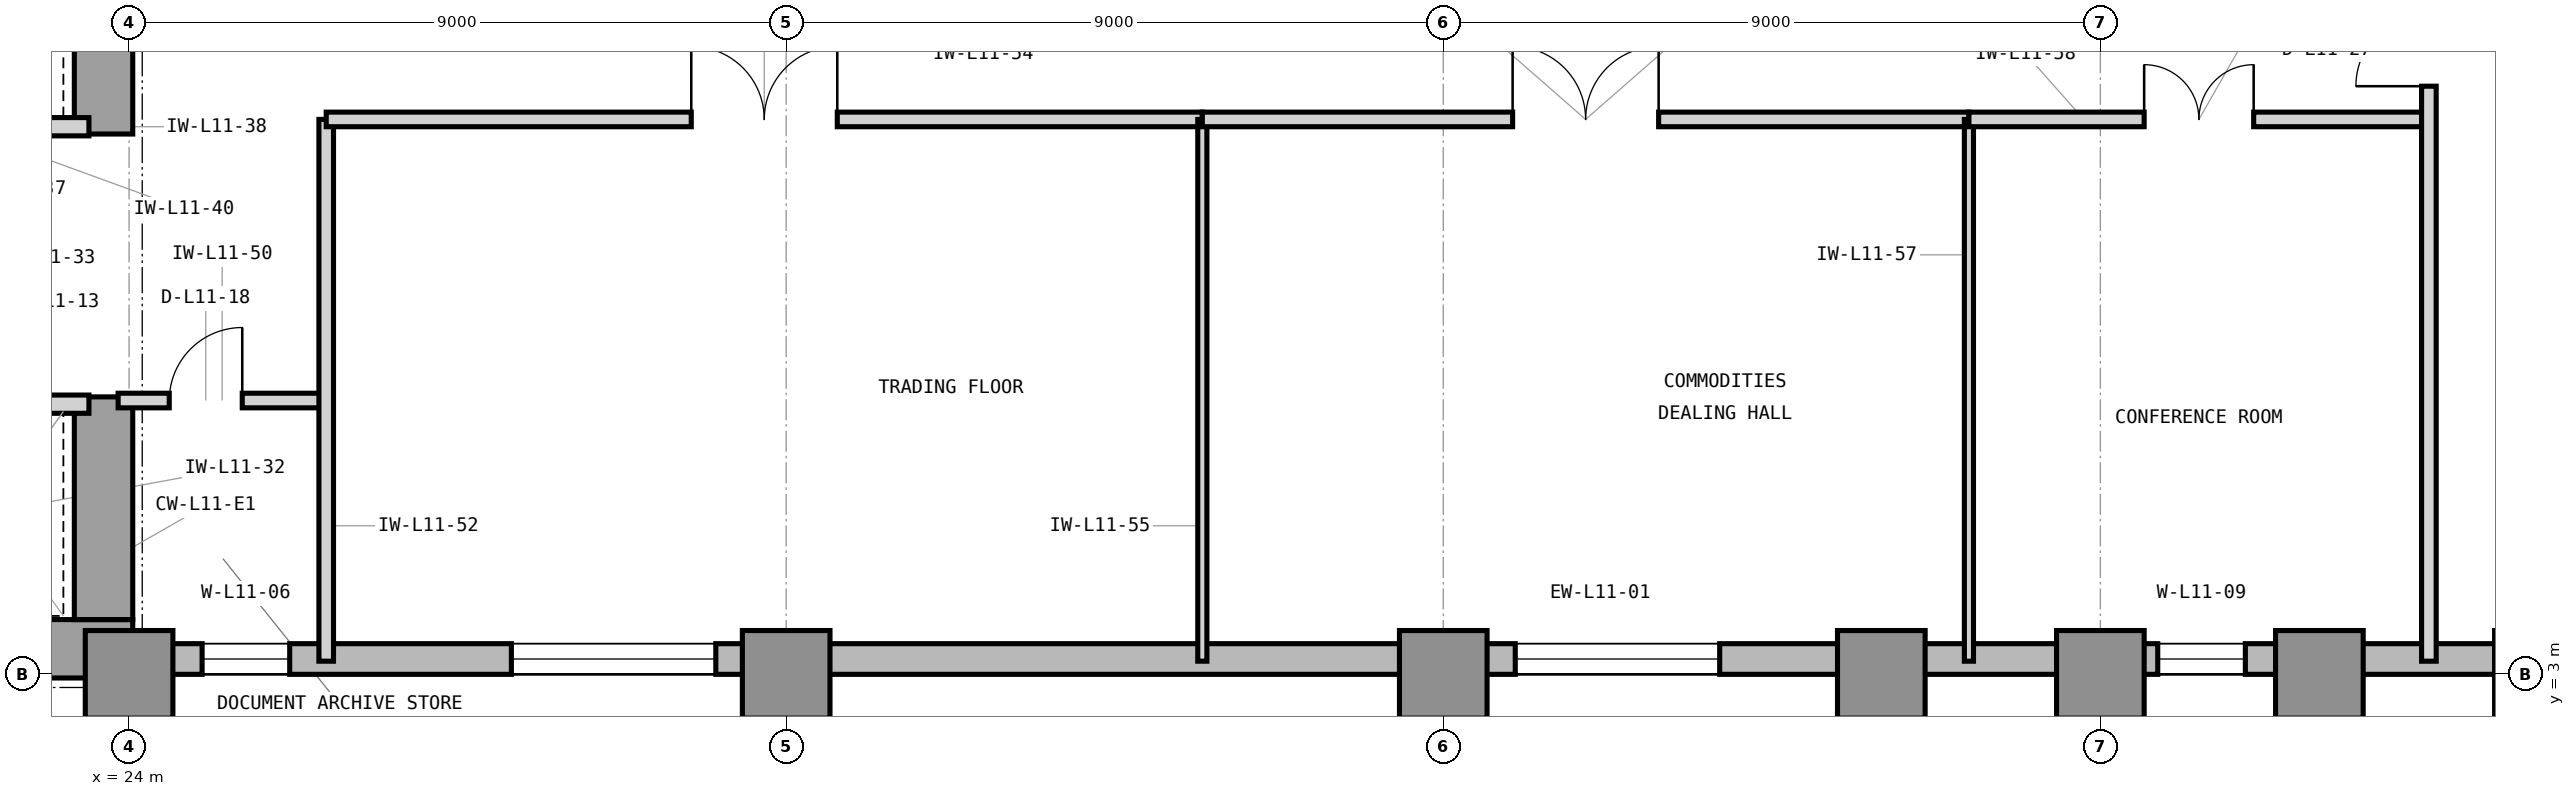
"""IFC4 building model, lengths in metres.
Left out: names, types, materials, properties, quantities, classifications, styles, units other than length and angle.
Written with IfcOpenShell. Run it as: python <this file> out.ifc"""

import sys

from ifc_helpers import new_model, si_unit, direction, frame, frame_2d, origin, origin_2d, place, context, subcontext, project, spatial, rectangle, extrude, element, fill, save


model = new_model("IFC4")
c1 = context("Model", 3, precision=1e-05, world=origin(), true_north=direction((0.0, 1.0)))
c2 = subcontext(c1, "Body", "Model", "MODEL_VIEW")
j1 = project(units=[si_unit("LENGTHUNIT", "METRE"), si_unit("PLANEANGLEUNIT", "RADIAN")], contexts=[c1])
p1 = place(None, origin())
s1 = spatial("IfcSite", under=j1, at=p1, CompositionType="ELEMENT")
p2 = place(p1, origin())
s2 = spatial("IfcBuilding", under=s1, at=p2, CompositionType="ELEMENT")
p3 = place(p2, frame((0.0, 0.0, 51.0)))
s3 = spatial("IfcBuildingStorey", under=s2, at=p3, CompositionType="ELEMENT", Elevation=51.0)
p4 = place(p3, frame((7.475, 3.35, 0.0), z_axis=(0.0, 0.0, 1.0), x_axis=(1.0, 0.0, 0.0)))
e1 = element("IfcWall", 1, at=p4, inside=s3, PredefinedType="SHEAR", context=c2, shape_type="SweptSolid", body=[
    extrude(rectangle(XDim=16.575, YDim=0.8, at=frame_2d((8.288, 0.0))), origin(), (0.0, 0.0, 1.0), 4.2),
])
p5 = place(p3, frame((23.65, 3.75, 0.0), z_axis=(0.0, 0.0, 1.0), x_axis=(0.0, 1.0, 0.0)))
e2 = element("IfcWall", 2, at=p5, inside=s3, PredefinedType="SHEAR", context=c2, shape_type="SweptSolid", body=[
    extrude(rectangle(XDim=3.05, YDim=0.8, at=frame_2d((1.525, 0.0))), origin(), (0.0, 0.0, 1.0), 4.2),
])
p6 = place(p3, frame((23.65, 10.4, 0.0), z_axis=(0.0, 0.0, 1.0), x_axis=(0.0, 1.0, 0.0)))
e3 = element("IfcWall", 3, at=p6, inside=s3, PredefinedType="SHEAR", context=c2, shape_type="SweptSolid", body=[
    extrude(rectangle(XDim=3.2, YDim=0.8, at=frame_2d((1.6, 0.0))), origin(), (0.0, 0.0, 1.0), 4.2),
])
for number, where, z_axis, x_axis in (
    (4, (24.0, 3.0, 0.0), (0.0, 0.0, 1.0), (1.0, 0.0, 0.0)),
    (5, (33.0, 3.0, 0.0), (0.0, 0.0, 1.0), (1.0, 0.0, 0.0)),
    (6, (42.0, 3.0, 0.0), (0.0, 0.0, 1.0), (1.0, 0.0, 0.0)),
    (7, (48.0, 3.0, 0.0), (0.0, 0.0, 1.0), (1.0, 0.0, 0.0)),
    (8, (51.0, 3.0, 0.0), (0.0, 0.0, 1.0), (1.0, 0.0, 0.0)),
    (9, (54.0, 3.0, 0.0), (0.0, 0.0, 1.0), (1.0, 0.0, 0.0)),
    (10, (57.0, 3.0, 0.0), (0.0, 0.0, 1.0), (1.0, 0.0, 0.0)),
):
    element("IfcColumn", number, at=place(p3, frame(where, z_axis=z_axis, x_axis=x_axis)), inside=s3, PredefinedType="COLUMN", context=c2, shape_type="SweptSolid", body=[
        extrude(rectangle(XDim=1.2, YDim=1.2, at=origin_2d()), origin(), (0.0, 0.0, 1.0), 4.2),
    ])
p7 = place(p3, frame((23.9, 3.21, 0.0), z_axis=(0.0, 0.0, 1.0), x_axis=(1.0, 0.0, 0.0)))
e11 = element("IfcWall", 11, at=p7, inside=s3, PredefinedType="STANDARD", context=c2, shape_type="SweptSolid", body=[
    extrude(rectangle(XDim=40.5, YDim=0.42, at=frame_2d((20.25, 0.0))), origin(), (0.0, 0.0, 1.0), 3.98),
])
p8 = place(p7, frame((1.1, 0.0, 0.85)))
e12 = element("IfcOpeningElement", 12, at=p8, cuts=e11, PredefinedType="OPENING", context=c2, shape_type="SweptSolid", body=[
    extrude(rectangle(XDim=1.2, YDim=2.45, at=frame_2d((0.6, 1.225))), frame((0.0, 0.22, 0.0), z_axis=(0.0, -1.0, 0.0), x_axis=(1.0, 0.0, 0.0)), (0.0, 0.0, 1.0), 0.44),
])
p9 = place(p7, frame((5.336, 0.0, 0.85)))
e13 = element("IfcOpeningElement", 13, at=p9, cuts=e11, PredefinedType="OPENING", context=c2, shape_type="SweptSolid", body=[
    extrude(rectangle(XDim=2.8, YDim=2.45, at=frame_2d((1.4, 1.225))), frame((0.0, 0.22, 0.0), z_axis=(0.0, -1.0, 0.0), x_axis=(1.0, 0.0, 0.0)), (0.0, 0.0, 1.0), 0.44),
])
p10 = place(p7, frame((19.086, 0.0, 0.85)))
e14 = element("IfcOpeningElement", 14, at=p10, cuts=e11, PredefinedType="OPENING", context=c2, shape_type="SweptSolid", body=[
    extrude(rectangle(XDim=2.8, YDim=2.45, at=frame_2d((1.4, 1.225))), frame((0.0, 0.22, 0.0), z_axis=(0.0, -1.0, 0.0), x_axis=(1.0, 0.0, 0.0)), (0.0, 0.0, 1.0), 0.44),
])
p11 = place(p7, frame((27.886, 0.0, 0.85)))
e15 = element("IfcOpeningElement", 15, at=p11, cuts=e11, PredefinedType="OPENING", context=c2, shape_type="SweptSolid", body=[
    extrude(rectangle(XDim=1.2, YDim=2.45, at=frame_2d((0.6, 1.225))), frame((0.0, 0.22, 0.0), z_axis=(0.0, -1.0, 0.0), x_axis=(1.0, 0.0, 0.0)), (0.0, 0.0, 1.0), 0.44),
])
p12 = place(p3, frame((21.05, 6.7, 0.0), z_axis=(0.0, 0.0, 1.0), x_axis=(1.0, 0.0, 0.0)))
e16 = element("IfcWall", 16, at=p12, inside=s3, PredefinedType="PARTITIONING", context=c2, shape_type="SweptSolid", body=[
    extrude(rectangle(XDim=2.4, YDim=0.25, at=frame_2d((1.2, 0.0))), origin(), (0.0, 0.0, 1.0), 3.426),
])
p13 = place(p12, frame((0.48, 0.0, 0.0)))
e17 = element("IfcOpeningElement", 17, at=p13, cuts=e16, PredefinedType="OPENING", context=c2, shape_type="SweptSolid", body=[
    extrude(rectangle(XDim=1.15, YDim=2.25, at=frame_2d((0.575, 1.125))), frame((0.0, 0.135, 0.0), z_axis=(0.0, -1.0, 0.0), x_axis=(1.0, 0.0, 0.0)), (0.0, 0.0, 1.0), 0.27),
])
p14 = place(p3, frame((21.05, 10.5, 0.0), z_axis=(0.0, 0.0, 1.0), x_axis=(1.0, 0.0, 0.0)))
e18 = element("IfcWall", 18, at=p14, inside=s3, PredefinedType="PARTITIONING", context=c2, shape_type="SweptSolid", body=[
    extrude(rectangle(XDim=2.4, YDim=0.25, at=frame_2d((1.2, 0.0))), origin(), (0.0, 0.0, 1.0), 3.426),
])
p15 = place(p3, frame((23.85, 6.75, 0.0), z_axis=(0.0, 0.0, 1.0), x_axis=(1.0, 0.0, 0.0)))
e19 = element("IfcWall", 19, at=p15, inside=s3, PredefinedType="PARTITIONING", context=c2, shape_type="SweptSolid", body=[
    extrude(rectangle(XDim=2.85, YDim=0.2, at=frame_2d((1.425, 0.0))), origin(), (0.0, 0.0, 1.0), 3.97),
])
p16 = place(p15, frame((0.7, 0.0, 0.0)))
e20 = element("IfcOpeningElement", 20, at=p16, cuts=e19, PredefinedType="OPENING", context=c2, shape_type="SweptSolid", body=[
    extrude(rectangle(XDim=1.0, YDim=2.15, at=frame_2d((0.5, 1.075))), frame((0.0, 0.11, 0.0), z_axis=(0.0, -1.0, 0.0), x_axis=(1.0, 0.0, 0.0)), (0.0, 0.0, 1.0), 0.22),
])
p17 = place(p3, frame((26.7, 3.18, 0.0), z_axis=(0.0, 0.0, 1.0), x_axis=(0.0, 1.0, 0.0)))
e21 = element("IfcWall", 21, at=p17, inside=s3, PredefinedType="PARTITIONING", context=c2, shape_type="SweptSolid", body=[
    extrude(rectangle(XDim=7.42, YDim=0.2, at=frame_2d((3.71, 0.0))), origin(), (0.0, 0.0, 1.0), 3.97),
])
p18 = place(p3, frame((26.7, 10.6, 0.0), z_axis=(0.0, 0.0, 1.0), x_axis=(1.0, 0.0, 0.0)))
e22 = element("IfcWall", 22, at=p18, inside=s3, PredefinedType="PARTITIONING", context=c2, shape_type="SweptSolid", body=[
    extrude(rectangle(XDim=12.0, YDim=0.2, at=frame_2d((6.0, 0.0))), origin(), (0.0, 0.0, 1.0), 3.97),
])
p19 = place(p18, frame((5.0, 0.0, 0.0)))
e23 = element("IfcOpeningElement", 23, at=p19, cuts=e22, PredefinedType="OPENING", context=c2, shape_type="SweptSolid", body=[
    extrude(rectangle(XDim=2.0, YDim=2.5, at=frame_2d((1.0, 1.25))), frame((0.0, 0.11, 0.0), z_axis=(0.0, -1.0, 0.0), x_axis=(1.0, 0.0, 0.0)), (0.0, 0.0, 1.0), 0.22),
])
p20 = place(p3, frame((38.7, 3.18, 0.0), z_axis=(0.0, 0.0, 1.0), x_axis=(0.0, 1.0, 0.0)))
e24 = element("IfcWall", 24, at=p20, inside=s3, PredefinedType="PARTITIONING", context=c2, shape_type="SweptSolid", body=[
    extrude(rectangle(XDim=7.42, YDim=0.125, at=frame_2d((3.71, 0.0))), origin(), (0.0, 0.0, 1.0), 3.97),
])
p21 = place(p3, frame((38.7, 10.6, 0.0), z_axis=(0.0, 0.0, 1.0), x_axis=(1.0, 0.0, 0.0)))
e25 = element("IfcWall", 25, at=p21, inside=s3, PredefinedType="PARTITIONING", context=c2, shape_type="SweptSolid", body=[
    extrude(rectangle(XDim=10.5, YDim=0.2, at=frame_2d((5.25, 0.0))), origin(), (0.0, 0.0, 1.0), 3.97),
])
p22 = place(p21, frame((4.25, 0.0, 0.0)))
e26 = element("IfcOpeningElement", 26, at=p22, cuts=e25, PredefinedType="OPENING", context=c2, shape_type="SweptSolid", body=[
    extrude(rectangle(XDim=2.0, YDim=2.5, at=frame_2d((1.0, 1.25))), frame((0.0, 0.11, 0.0), z_axis=(0.0, -1.0, 0.0), x_axis=(1.0, 0.0, 0.0)), (0.0, 0.0, 1.0), 0.22),
])
p23 = place(p3, frame((49.2, 3.18, 0.0), z_axis=(0.0, 0.0, 1.0), x_axis=(0.0, 1.0, 0.0)))
e27 = element("IfcWall", 27, at=p23, inside=s3, PredefinedType="PARTITIONING", context=c2, shape_type="SweptSolid", body=[
    extrude(rectangle(XDim=7.42, YDim=0.125, at=frame_2d((3.71, 0.0))), origin(), (0.0, 0.0, 1.0), 3.97),
])
p24 = place(p3, frame((49.2, 10.6, 0.0), z_axis=(0.0, 0.0, 1.0), x_axis=(1.0, 0.0, 0.0)))
e28 = element("IfcWall", 28, at=p24, inside=s3, PredefinedType="PARTITIONING", context=c2, shape_type="SweptSolid", body=[
    extrude(rectangle(XDim=6.3, YDim=0.2, at=frame_2d((3.15, 0.0))), origin(), (0.0, 0.0, 1.0), 3.97),
])
p25 = place(p24, frame((2.4, 0.0, 0.0)))
e29 = element("IfcOpeningElement", 29, at=p25, cuts=e28, PredefinedType="OPENING", context=c2, shape_type="SweptSolid", body=[
    extrude(rectangle(XDim=1.5, YDim=2.3, at=frame_2d((0.75, 1.15))), frame((0.0, 0.11, 0.0), z_axis=(0.0, -1.0, 0.0), x_axis=(1.0, 0.0, 0.0)), (0.0, 0.0, 1.0), 0.22),
])
p26 = place(p3, frame((55.5, 3.18, 0.0), z_axis=(0.0, 0.0, 1.0), x_axis=(0.0, 1.0, 0.0)))
e30 = element("IfcWall", 30, at=p26, inside=s3, PredefinedType="PARTITIONING", context=c2, shape_type="SweptSolid", body=[
    extrude(rectangle(XDim=17.64, YDim=0.2, at=frame_2d((8.82, 0.0))), origin(), (0.0, 0.0, 1.0), 3.97),
])
p27 = place(p26, frame((7.875, 0.0, 0.0)))
e31 = element("IfcOpeningElement", 31, at=p27, cuts=e30, PredefinedType="OPENING", context=c2, shape_type="SweptSolid", body=[
    extrude(rectangle(XDim=1.0, YDim=2.15, at=frame_2d((0.5, 1.075))), frame((0.0, 0.11, 0.0), z_axis=(0.0, -1.0, 0.0), x_axis=(1.0, 0.0, 0.0)), (0.0, 0.0, 1.0), 0.22),
])
p28 = place(p16, origin())
e32 = element("IfcDoor", 32, at=p28, inside=s3, OperationType="SINGLE_SWING_RIGHT", PredefinedType="DOOR", context=c2, shape_type="SweptSolid", body=[
    extrude(rectangle(XDim=1.0, YDim=2.15, at=frame_2d((0.5, 1.075))), frame((0.0, 0.025, 0.0), z_axis=(0.0, -1.0, 0.0), x_axis=(1.0, 0.0, 0.0)), (0.0, 0.0, 1.0), 0.05),
])
fill(e20, e32)
p29 = place(p19, origin())
e33 = element("IfcDoor", 33, at=p29, inside=s3, OperationType="DOUBLE_DOOR_SINGLE_SWING", PredefinedType="DOOR", context=c2, shape_type="SweptSolid", body=[
    extrude(rectangle(XDim=2.0, YDim=2.5, at=frame_2d((1.0, 1.25))), frame((0.0, 0.025, 0.0), z_axis=(0.0, -1.0, 0.0), x_axis=(1.0, 0.0, 0.0)), (0.0, 0.0, 1.0), 0.05),
])
fill(e23, e33)
p30 = place(p22, origin())
e34 = element("IfcDoor", 34, at=p30, inside=s3, OperationType="DOUBLE_DOOR_SINGLE_SWING", PredefinedType="DOOR", context=c2, shape_type="SweptSolid", body=[
    extrude(rectangle(XDim=2.0, YDim=2.5, at=frame_2d((1.0, 1.25))), frame((0.0, 0.025, 0.0), z_axis=(0.0, -1.0, 0.0), x_axis=(1.0, 0.0, 0.0)), (0.0, 0.0, 1.0), 0.05),
])
fill(e26, e34)
p31 = place(p25, origin())
e35 = element("IfcDoor", 35, at=p31, inside=s3, OperationType="DOUBLE_DOOR_SINGLE_SWING", PredefinedType="DOOR", context=c2, shape_type="SweptSolid", body=[
    extrude(rectangle(XDim=1.5, YDim=2.3, at=frame_2d((0.75, 1.15))), frame((0.0, 0.025, 0.0), z_axis=(0.0, -1.0, 0.0), x_axis=(1.0, 0.0, 0.0)), (0.0, 0.0, 1.0), 0.05),
])
fill(e29, e35)
p32 = place(p27, origin())
e36 = element("IfcDoor", 36, at=p32, inside=s3, OperationType="SINGLE_SWING_LEFT", PredefinedType="DOOR", context=c2, shape_type="SweptSolid", body=[
    extrude(rectangle(XDim=1.0, YDim=2.15, at=frame_2d((0.5, 1.075))), frame((0.0, 0.025, 0.0), z_axis=(0.0, -1.0, 0.0), x_axis=(1.0, 0.0, 0.0)), (0.0, 0.0, 1.0), 0.05),
])
fill(e31, e36)
p33 = place(p8, origin())
e37 = element("IfcWindow", 37, at=p33, inside=s3, PartitioningType="SINGLE_PANEL", PredefinedType="WINDOW", context=c2, shape_type="SweptSolid", body=[
    extrude(rectangle(XDim=1.2, YDim=2.45, at=frame_2d((0.6, 1.225))), frame((0.0, 0.11, 0.0), z_axis=(0.0, -1.0, 0.0), x_axis=(1.0, 0.0, 0.0)), (0.0, 0.0, 1.0), 0.06),
])
fill(e12, e37)
p34 = place(p9, origin())
e38 = element("IfcWindow", 38, at=p34, inside=s3, PartitioningType="SINGLE_PANEL", PredefinedType="WINDOW", context=c2, shape_type="SweptSolid", body=[
    extrude(rectangle(XDim=2.8, YDim=2.45, at=frame_2d((1.4, 1.225))), frame((0.0, 0.11, 0.0), z_axis=(0.0, -1.0, 0.0), x_axis=(1.0, 0.0, 0.0)), (0.0, 0.0, 1.0), 0.06),
])
fill(e13, e38)
p35 = place(p10, origin())
e39 = element("IfcWindow", 39, at=p35, inside=s3, PartitioningType="SINGLE_PANEL", PredefinedType="WINDOW", context=c2, shape_type="SweptSolid", body=[
    extrude(rectangle(XDim=2.8, YDim=2.45, at=frame_2d((1.4, 1.225))), frame((0.0, 0.11, 0.0), z_axis=(0.0, -1.0, 0.0), x_axis=(1.0, 0.0, 0.0)), (0.0, 0.0, 1.0), 0.06),
])
fill(e14, e39)
p36 = place(p11, origin())
e40 = element("IfcWindow", 40, at=p36, inside=s3, PartitioningType="SINGLE_PANEL", PredefinedType="WINDOW", context=c2, shape_type="SweptSolid", body=[
    extrude(rectangle(XDim=1.2, YDim=2.45, at=frame_2d((0.6, 1.225))), frame((0.0, 0.11, 0.0), z_axis=(0.0, -1.0, 0.0), x_axis=(1.0, 0.0, 0.0)), (0.0, 0.0, 1.0), 0.06),
])
fill(e15, e40)
save(model, sys.argv[1])
